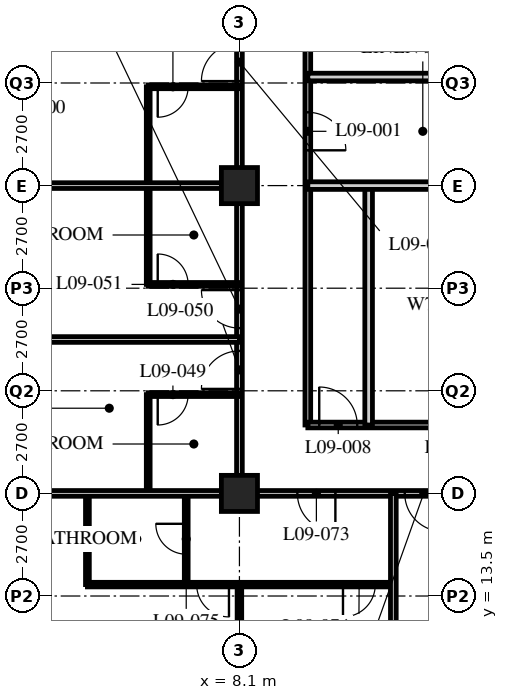
"""IFC4 building model, lengths in metres.
Left out: names, types, materials, properties, quantities, classifications, styles, units other than length and angle.
Written with IfcOpenShell. Run it as: python <this file> out.ifc"""

import sys

from ifc_helpers import new_model, si_unit, direction, frame, frame_2d, origin, origin_2d, place, context, subcontext, project, spatial, rectangle, hollow_rectangle, extrude, element, fill, save


model = new_model("IFC4")
c1 = context("Model", 3, precision=1e-05, world=origin(), true_north=direction((0.0, 1.0)))
c2 = subcontext(c1, "Body", "Model", "MODEL_VIEW")
j1 = project(units=[si_unit("LENGTHUNIT", "METRE"), si_unit("PLANEANGLEUNIT", "RADIAN")], contexts=[c1])
p1 = place(None, origin())
s1 = spatial("IfcSite", under=j1, at=p1, CompositionType="ELEMENT")
p2 = place(p1, origin())
s2 = spatial("IfcBuilding", under=s1, at=p2, CompositionType="ELEMENT")
p3 = place(p2, frame((0.0, 0.0, 43.2)))
s3 = spatial("IfcBuildingStorey", under=s2, at=p3, CompositionType="ELEMENT", Elevation=43.2)
for number, where, z_axis, x_axis in (
    (1, (8.1, 16.2, 0.0), (0.0, 0.0, 1.0), (1.0, 0.0, 0.0)),
    (2, (8.1, 24.3, 0.0), (0.0, 0.0, 1.0), (1.0, 0.0, 0.0)),
):
    element("IfcColumn", number, at=place(p3, frame(where, z_axis=z_axis, x_axis=x_axis)), inside=s3, PredefinedType="COLUMN", context=c2, shape_type="SweptSolid", body=[
        extrude(hollow_rectangle(XDim=0.95, YDim=0.95, WallThickness=0.095, at=origin_2d()), origin(), (0.0, 0.0, 1.0), 3.4),
    ])
p4 = place(p3, frame((8.1, 16.2, 0.0), z_axis=(0.0, 0.0, 1.0), x_axis=(1.0, 0.0, 0.0)))
e3 = element("IfcWall", 3, at=p4, inside=s3, PredefinedType="PARTITIONING", context=c2, shape_type="SweptSolid", body=[
    extrude(rectangle(XDim=40.5, YDim=0.15, at=frame_2d((20.25, 0.0))), origin(), (0.0, 0.0, 1.0), 2.578),
])
p5 = place(p4, frame((4.35, 0.0, 0.0)))
e4 = element("IfcOpeningElement", 4, at=p5, cuts=e3, PredefinedType="OPENING", context=c2, shape_type="SweptSolid", body=[
    extrude(rectangle(XDim=1.0, YDim=2.1, at=frame_2d((0.5, 1.05))), frame((0.0, 0.085, 0.0), z_axis=(0.0, -1.0, 0.0), x_axis=(1.0, 0.0, 0.0)), (0.0, 0.0, 1.0), 0.17),
])
p6 = place(p4, frame((10.85, 0.0, 0.0)))
e5 = element("IfcOpeningElement", 5, at=p6, cuts=e3, PredefinedType="OPENING", context=c2, shape_type="SweptSolid", body=[
    extrude(rectangle(XDim=1.0, YDim=2.1, at=frame_2d((0.5, 1.05))), frame((0.0, 0.085, 0.0), z_axis=(0.0, -1.0, 0.0), x_axis=(1.0, 0.0, 0.0)), (0.0, 0.0, 1.0), 0.17),
])
p7 = place(p4, frame((12.75, 0.0, 0.0)))
e6 = element("IfcOpeningElement", 6, at=p7, cuts=e3, PredefinedType="OPENING", context=c2, shape_type="SweptSolid", body=[
    extrude(rectangle(XDim=1.0, YDim=2.1, at=frame_2d((0.5, 1.05))), frame((0.0, 0.085, 0.0), z_axis=(0.0, -1.0, 0.0), x_axis=(1.0, 0.0, 0.0)), (0.0, 0.0, 1.0), 0.17),
])
p8 = place(p4, frame((18.95, 0.0, 0.0)))
e7 = element("IfcOpeningElement", 7, at=p8, cuts=e3, PredefinedType="OPENING", context=c2, shape_type="SweptSolid", body=[
    extrude(rectangle(XDim=1.0, YDim=2.1, at=frame_2d((0.5, 1.05))), frame((0.0, 0.085, 0.0), z_axis=(0.0, -1.0, 0.0), x_axis=(1.0, 0.0, 0.0)), (0.0, 0.0, 1.0), 0.17),
])
p9 = place(p4, frame((20.55, 0.0, 0.0)))
e8 = element("IfcOpeningElement", 8, at=p9, cuts=e3, PredefinedType="OPENING", context=c2, shape_type="SweptSolid", body=[
    extrude(rectangle(XDim=1.0, YDim=2.1, at=frame_2d((0.5, 1.05))), frame((0.0, 0.085, 0.0), z_axis=(0.0, -1.0, 0.0), x_axis=(1.0, 0.0, 0.0)), (0.0, 0.0, 1.0), 0.17),
])
p10 = place(p4, frame((27.05, 0.0, 0.0)))
e9 = element("IfcOpeningElement", 9, at=p10, cuts=e3, PredefinedType="OPENING", context=c2, shape_type="SweptSolid", body=[
    extrude(rectangle(XDim=1.0, YDim=2.1, at=frame_2d((0.5, 1.05))), frame((0.0, 0.085, 0.0), z_axis=(0.0, -1.0, 0.0), x_axis=(1.0, 0.0, 0.0)), (0.0, 0.0, 1.0), 0.17),
])
p11 = place(p4, frame((28.95, 0.0, 0.0)))
e10 = element("IfcOpeningElement", 10, at=p11, cuts=e3, PredefinedType="OPENING", context=c2, shape_type="SweptSolid", body=[
    extrude(rectangle(XDim=1.0, YDim=2.1, at=frame_2d((0.5, 1.05))), frame((0.0, 0.085, 0.0), z_axis=(0.0, -1.0, 0.0), x_axis=(1.0, 0.0, 0.0)), (0.0, 0.0, 1.0), 0.17),
])
p12 = place(p4, frame((34.85, 0.0, 0.0)))
e11 = element("IfcOpeningElement", 11, at=p12, cuts=e3, PredefinedType="OPENING", context=c2, shape_type="SweptSolid", body=[
    extrude(rectangle(XDim=1.0, YDim=2.1, at=frame_2d((0.5, 1.05))), frame((0.0, 0.085, 0.0), z_axis=(0.0, -1.0, 0.0), x_axis=(1.0, 0.0, 0.0)), (0.0, 0.0, 1.0), 0.17),
])
p13 = place(p4, frame((1.525, 0.0, 0.0)))
e12 = element("IfcOpeningElement", 12, at=p13, cuts=e3, PredefinedType="OPENING", context=c2, shape_type="SweptSolid", body=[
    extrude(rectangle(XDim=1.0, YDim=2.1, at=frame_2d((0.5, 1.05))), frame((0.0, 0.085, 0.0), z_axis=(0.0, -1.0, 0.0), x_axis=(1.0, 0.0, 0.0)), (0.0, 0.0, 1.0), 0.17),
])
p14 = place(p4, frame((37.975, 0.0, 0.0)))
e13 = element("IfcOpeningElement", 13, at=p14, cuts=e3, PredefinedType="OPENING", context=c2, shape_type="SweptSolid", body=[
    extrude(rectangle(XDim=1.0, YDim=2.1, at=frame_2d((0.5, 1.05))), frame((0.0, 0.085, 0.0), z_axis=(0.0, -1.0, 0.0), x_axis=(1.0, 0.0, 0.0)), (0.0, 0.0, 1.0), 0.17),
])
p15 = place(p3, frame((8.1, 16.2, 0.0), z_axis=(0.0, 0.0, 1.0), x_axis=(0.0, 1.0, 0.0)))
e14 = element("IfcWall", 14, at=p15, inside=s3, PredefinedType="PARTITIONING", context=c2, shape_type="SweptSolid", body=[
    extrude(rectangle(XDim=26.1, YDim=0.15, at=frame_2d((13.05, 0.0))), origin(), (0.0, 0.0, 1.0), 2.578),
])
p16 = place(p15, frame((2.75, 0.0, 0.0)))
e15 = element("IfcOpeningElement", 15, at=p16, cuts=e14, PredefinedType="OPENING", context=c2, shape_type="SweptSolid", body=[
    extrude(rectangle(XDim=1.0, YDim=2.1, at=frame_2d((0.5, 1.05))), frame((0.0, 0.085, 0.0), z_axis=(0.0, -1.0, 0.0), x_axis=(1.0, 0.0, 0.0)), (0.0, 0.0, 1.0), 0.17),
])
p17 = place(p15, frame((4.35, 0.0, 0.0)))
e16 = element("IfcOpeningElement", 16, at=p17, cuts=e14, PredefinedType="OPENING", context=c2, shape_type="SweptSolid", body=[
    extrude(rectangle(XDim=1.0, YDim=2.1, at=frame_2d((0.5, 1.05))), frame((0.0, 0.085, 0.0), z_axis=(0.0, -1.0, 0.0), x_axis=(1.0, 0.0, 0.0)), (0.0, 0.0, 1.0), 0.17),
])
p18 = place(p15, frame((10.85, 0.0, 0.0)))
e17 = element("IfcOpeningElement", 17, at=p18, cuts=e14, PredefinedType="OPENING", context=c2, shape_type="SweptSolid", body=[
    extrude(rectangle(XDim=1.0, YDim=2.1, at=frame_2d((0.5, 1.05))), frame((0.0, 0.085, 0.0), z_axis=(0.0, -1.0, 0.0), x_axis=(1.0, 0.0, 0.0)), (0.0, 0.0, 1.0), 0.17),
])
p19 = place(p15, frame((12.45, 0.0, 0.0)))
e18 = element("IfcOpeningElement", 18, at=p19, cuts=e14, PredefinedType="OPENING", context=c2, shape_type="SweptSolid", body=[
    extrude(rectangle(XDim=1.0, YDim=2.1, at=frame_2d((0.5, 1.05))), frame((0.0, 0.085, 0.0), z_axis=(0.0, -1.0, 0.0), x_axis=(1.0, 0.0, 0.0)), (0.0, 0.0, 1.0), 0.17),
])
p20 = place(p15, frame((18.65, 0.0, 0.0)))
e19 = element("IfcOpeningElement", 19, at=p20, cuts=e14, PredefinedType="OPENING", context=c2, shape_type="SweptSolid", body=[
    extrude(rectangle(XDim=1.0, YDim=2.1, at=frame_2d((0.5, 1.05))), frame((0.0, 0.085, 0.0), z_axis=(0.0, -1.0, 0.0), x_axis=(1.0, 0.0, 0.0)), (0.0, 0.0, 1.0), 0.17),
])
p21 = place(p15, frame((22.7, 0.0, 0.0)))
e20 = element("IfcOpeningElement", 20, at=p21, cuts=e14, PredefinedType="OPENING", context=c2, shape_type="SweptSolid", body=[
    extrude(rectangle(XDim=1.0, YDim=2.1, at=frame_2d((0.5, 1.05))), frame((0.0, 0.085, 0.0), z_axis=(0.0, -1.0, 0.0), x_axis=(1.0, 0.0, 0.0)), (0.0, 0.0, 1.0), 0.17),
])
p22 = place(p3, frame((9.9, 40.5, 0.0), z_axis=(0.0, 0.0, 1.0), x_axis=(0.0, -1.0, 0.0)))
e21 = element("IfcWall", 21, at=p22, inside=s3, PredefinedType="PARTITIONING", context=c2, shape_type="SweptSolid", body=[
    extrude(rectangle(XDim=22.5, YDim=0.15, at=frame_2d((11.25, 0.0))), origin(), (0.0, 0.0, 1.0), 3.19),
])
p23 = place(p22, frame((14.271, 0.0, 0.0)))
e22 = element("IfcOpeningElement", 22, at=p23, cuts=e21, PredefinedType="OPENING", context=c2, shape_type="SweptSolid", body=[
    extrude(rectangle(XDim=1.0, YDim=2.1, at=frame_2d((0.5, 1.05))), frame((0.0, 0.085, 0.0), z_axis=(0.0, -1.0, 0.0), x_axis=(1.0, 0.0, 0.0)), (0.0, 0.0, 1.0), 0.17),
])
p24 = place(p22, frame((10.221, 0.0, 0.0)))
e23 = element("IfcOpeningElement", 23, at=p24, cuts=e21, PredefinedType="OPENING", context=c2, shape_type="SweptSolid", body=[
    extrude(rectangle(XDim=1.0, YDim=2.1, at=frame_2d((0.5, 1.05))), frame((0.0, 0.085, 0.0), z_axis=(0.0, -1.0, 0.0), x_axis=(1.0, 0.0, 0.0)), (0.0, 0.0, 1.0), 0.17),
])
p25 = place(p22, frame((6.8, 0.0, 0.0)))
e24 = element("IfcOpeningElement", 24, at=p25, cuts=e21, PredefinedType="OPENING", context=c2, shape_type="SweptSolid", body=[
    extrude(rectangle(XDim=1.0, YDim=2.1, at=frame_2d((0.5, 1.05))), frame((0.0, 0.085, 0.0), z_axis=(0.0, -1.0, 0.0), x_axis=(1.0, 0.0, 0.0)), (0.0, 0.0, 1.0), 0.17),
])
p26 = place(p22, frame((2.75, 0.0, 0.0)))
e25 = element("IfcOpeningElement", 25, at=p26, cuts=e21, PredefinedType="OPENING", context=c2, shape_type="SweptSolid", body=[
    extrude(rectangle(XDim=1.0, YDim=2.1, at=frame_2d((0.5, 1.05))), frame((0.0, 0.085, 0.0), z_axis=(0.0, -1.0, 0.0), x_axis=(1.0, 0.0, 0.0)), (0.0, 0.0, 1.0), 0.17),
])
p27 = place(p3, frame((9.9, 18.0, 0.0), z_axis=(0.0, 0.0, 1.0), x_axis=(1.0, 0.0, 0.0)))
e26 = element("IfcWall", 26, at=p27, inside=s3, PredefinedType="PARTITIONING", context=c2, shape_type="SweptSolid", body=[
    extrude(rectangle(XDim=17.24, YDim=0.15, at=frame_2d((8.62, 0.0))), origin(), (0.0, 0.0, 1.0), 3.19),
])
p28 = place(p27, frame((0.3, 0.0, 0.0)))
e27 = element("IfcOpeningElement", 27, at=p28, cuts=e26, PredefinedType="OPENING", context=c2, shape_type="SweptSolid", body=[
    extrude(rectangle(XDim=1.0, YDim=2.1, at=frame_2d((0.5, 1.05))), frame((0.0, 0.085, 0.0), z_axis=(0.0, -1.0, 0.0), x_axis=(1.0, 0.0, 0.0)), (0.0, 0.0, 1.0), 0.17),
])
p29 = place(p27, frame((3.45, 0.0, 0.0)))
e28 = element("IfcOpeningElement", 28, at=p29, cuts=e26, PredefinedType="OPENING", context=c2, shape_type="SweptSolid", body=[
    extrude(rectangle(XDim=1.0, YDim=2.1, at=frame_2d((0.5, 1.05))), frame((0.0, 0.085, 0.0), z_axis=(0.0, -1.0, 0.0), x_axis=(1.0, 0.0, 0.0)), (0.0, 0.0, 1.0), 0.17),
])
p30 = place(p27, frame((7.229, 0.0, 0.0)))
e29 = element("IfcOpeningElement", 29, at=p30, cuts=e26, PredefinedType="OPENING", context=c2, shape_type="SweptSolid", body=[
    extrude(rectangle(XDim=1.0, YDim=2.1, at=frame_2d((0.5, 1.05))), frame((0.0, 0.085, 0.0), z_axis=(0.0, -1.0, 0.0), x_axis=(1.0, 0.0, 0.0)), (0.0, 0.0, 1.0), 0.17),
])
p31 = place(p27, frame((12.704, 0.0, 0.0)))
e30 = element("IfcOpeningElement", 30, at=p31, cuts=e26, PredefinedType="OPENING", context=c2, shape_type="SweptSolid", body=[
    extrude(rectangle(XDim=1.0, YDim=2.1, at=frame_2d((0.5, 1.05))), frame((0.0, 0.085, 0.0), z_axis=(0.0, -1.0, 0.0), x_axis=(1.0, 0.0, 0.0)), (0.0, 0.0, 1.0), 0.17),
])
for number, where, z_axis, x_axis in (
    (31, (9.9, 27.157, 0.0), (0.0, 0.0, 1.0), (1.0, 0.0, 0.0)),
    (32, (11.5, 18.0, 0.0), (0.0, 0.0, 1.0), (0.0, 1.0, 0.0)),
):
    element("IfcWall", number, at=place(p3, frame(where, z_axis=z_axis, x_axis=x_axis)), inside=s3, PredefinedType="SOLIDWALL", context=c2, shape_type="SweptSolid", body=[
        extrude(rectangle(XDim=6.3, YDim=0.2, at=frame_2d((3.15, 0.0))), origin(), (0.0, 0.0, 1.0), 3.19),
    ])
p32 = place(p3, frame((9.9, 24.3, 0.0), z_axis=(0.0, 0.0, 1.0), x_axis=(1.0, 0.0, 0.0)))
e33 = element("IfcWall", 33, at=p32, inside=s3, PredefinedType="SOLIDWALL", context=c2, shape_type="SweptSolid", body=[
    extrude(rectangle(XDim=6.3, YDim=0.2, at=frame_2d((3.15, 0.0))), origin(), (0.0, 0.0, 1.0), 2.578),
])
p33 = place(p3, frame((5.7, 16.2, 0.0), z_axis=(0.0, 0.0, 1.0), x_axis=(0.0, 1.0, 0.0)))
e34 = element("IfcWall", 34, at=p33, inside=s3, PredefinedType="PARTITIONING", context=c2, shape_type="SweptSolid", body=[
    extrude(rectangle(XDim=2.6, YDim=0.1, at=frame_2d((1.3, 0.0))), origin(), (0.0, 0.0, 1.0), 3.19),
])
p34 = place(p3, frame((8.1, 18.8, 0.0), z_axis=(0.0, 0.0, 1.0), x_axis=(-1.0, 0.0, 0.0)))
e35 = element("IfcWall", 35, at=p34, inside=s3, PredefinedType="PARTITIONING", context=c2, shape_type="SweptSolid", body=[
    extrude(rectangle(XDim=2.4, YDim=0.1, at=frame_2d((1.2, 0.0))), origin(), (0.0, 0.0, 1.0), 3.19),
])
p35 = place(p34, frame((1.35, 0.0, 0.0)))
e36 = element("IfcOpeningElement", 36, at=p35, cuts=e35, PredefinedType="OPENING", context=c2, shape_type="SweptSolid", body=[
    extrude(rectangle(XDim=0.8, YDim=2.1, at=frame_2d((0.4, 1.05))), frame((0.0, 0.06, 0.0), z_axis=(0.0, -1.0, 0.0), x_axis=(1.0, 0.0, 0.0)), (0.0, 0.0, 1.0), 0.12),
])
p36 = place(p3, frame((8.1, 20.25, 0.0), z_axis=(0.0, 0.0, 1.0), x_axis=(-1.0, 0.0, 0.0)))
e37 = element("IfcWall", 37, at=p36, inside=s3, PredefinedType="PARTITIONING", context=c2, shape_type="SweptSolid", body=[
    extrude(rectangle(XDim=7.8, YDim=0.15, at=frame_2d((3.9, 0.0))), origin(), (0.0, 0.0, 1.0), 3.19),
])
p37 = place(p3, frame((5.7, 21.7, 0.0), z_axis=(0.0, 0.0, 1.0), x_axis=(0.0, 1.0, 0.0)))
e38 = element("IfcWall", 38, at=p37, inside=s3, PredefinedType="PARTITIONING", context=c2, shape_type="SweptSolid", body=[
    extrude(rectangle(XDim=5.2, YDim=0.1, at=frame_2d((2.6, 0.0))), origin(), (0.0, 0.0, 1.0), 3.19),
])
p38 = place(p3, frame((8.1, 21.7, 0.0), z_axis=(0.0, 0.0, 1.0), x_axis=(-1.0, 0.0, 0.0)))
e39 = element("IfcWall", 39, at=p38, inside=s3, PredefinedType="PARTITIONING", context=c2, shape_type="SweptSolid", body=[
    extrude(rectangle(XDim=2.4, YDim=0.1, at=frame_2d((1.2, 0.0))), origin(), (0.0, 0.0, 1.0), 3.19),
])
p39 = place(p38, frame((1.35, 0.0, 0.0)))
e40 = element("IfcOpeningElement", 40, at=p39, cuts=e39, PredefinedType="OPENING", context=c2, shape_type="SweptSolid", body=[
    extrude(rectangle(XDim=0.8, YDim=2.1, at=frame_2d((0.4, 1.05))), frame((0.0, 0.06, 0.0), z_axis=(0.0, -1.0, 0.0), x_axis=(1.0, 0.0, 0.0)), (0.0, 0.0, 1.0), 0.12),
])
p40 = place(p3, frame((8.1, 24.3, 0.0), z_axis=(0.0, 0.0, 1.0), x_axis=(-1.0, 0.0, 0.0)))
e41 = element("IfcWall", 41, at=p40, inside=s3, PredefinedType="PARTITIONING", context=c2, shape_type="SweptSolid", body=[
    extrude(rectangle(XDim=7.8, YDim=0.15, at=frame_2d((3.9, 0.0))), origin(), (0.0, 0.0, 1.0), 2.578),
])
p41 = place(p3, frame((8.1, 26.9, 0.0), z_axis=(0.0, 0.0, 1.0), x_axis=(-1.0, 0.0, 0.0)))
e42 = element("IfcWall", 42, at=p41, inside=s3, PredefinedType="PARTITIONING", context=c2, shape_type="SweptSolid", body=[
    extrude(rectangle(XDim=2.4, YDim=0.1, at=frame_2d((1.2, 0.0))), origin(), (0.0, 0.0, 1.0), 3.19),
])
p42 = place(p41, frame((1.35, 0.0, 0.0)))
e43 = element("IfcOpeningElement", 43, at=p42, cuts=e42, PredefinedType="OPENING", context=c2, shape_type="SweptSolid", body=[
    extrude(rectangle(XDim=0.8, YDim=2.1, at=frame_2d((0.4, 1.05))), frame((0.0, 0.06, 0.0), z_axis=(0.0, -1.0, 0.0), x_axis=(1.0, 0.0, 0.0)), (0.0, 0.0, 1.0), 0.12),
])
p43 = place(p3, frame((6.7, 16.2, 0.0), z_axis=(0.0, 0.0, 1.0), x_axis=(0.0, -1.0, 0.0)))
e44 = element("IfcWall", 44, at=p43, inside=s3, PredefinedType="PARTITIONING", context=c2, shape_type="SweptSolid", body=[
    extrude(rectangle(XDim=2.4, YDim=0.1, at=frame_2d((1.2, 0.0))), origin(), (0.0, 0.0, 1.0), 3.19),
])
p44 = place(p43, frame((0.8, 0.0, 0.0)))
e45 = element("IfcOpeningElement", 45, at=p44, cuts=e44, PredefinedType="OPENING", context=c2, shape_type="SweptSolid", body=[
    extrude(rectangle(XDim=0.8, YDim=2.1, at=frame_2d((0.4, 1.05))), frame((0.0, 0.06, 0.0), z_axis=(0.0, -1.0, 0.0), x_axis=(1.0, 0.0, 0.0)), (0.0, 0.0, 1.0), 0.12),
])
p45 = place(p3, frame((4.1, 16.2, 0.0), z_axis=(0.0, 0.0, 1.0), x_axis=(0.0, -1.0, 0.0)))
e46 = element("IfcWall", 46, at=p45, inside=s3, PredefinedType="PARTITIONING", context=c2, shape_type="SweptSolid", body=[
    extrude(rectangle(XDim=2.4, YDim=0.1, at=frame_2d((1.2, 0.0))), origin(), (0.0, 0.0, 1.0), 3.19),
])
p46 = place(p3, frame((4.1, 13.8, 0.0), z_axis=(0.0, 0.0, 1.0), x_axis=(1.0, 0.0, 0.0)))
e47 = element("IfcWall", 47, at=p46, inside=s3, PredefinedType="PARTITIONING", context=c2, shape_type="SweptSolid", body=[
    extrude(rectangle(XDim=8.05, YDim=0.12, at=frame_2d((4.025, 0.0))), origin(), (0.0, 0.0, 1.0), 3.19),
])
p47 = place(p46, frame((6.725, 0.0, 0.0)))
e48 = element("IfcOpeningElement", 48, at=p47, cuts=e47, PredefinedType="OPENING", context=c2, shape_type="SweptSolid", body=[
    extrude(rectangle(XDim=0.85, YDim=2.1, at=frame_2d((0.425, 1.05))), frame((0.0, 0.07, 0.0), z_axis=(0.0, -1.0, 0.0), x_axis=(1.0, 0.0, 0.0)), (0.0, 0.0, 1.0), 0.14),
])
p48 = place(p46, frame((2.875, 0.0, 0.0)))
e49 = element("IfcOpeningElement", 49, at=p48, cuts=e47, PredefinedType="OPENING", context=c2, shape_type="SweptSolid", body=[
    extrude(rectangle(XDim=0.85, YDim=2.1, at=frame_2d((0.425, 1.05))), frame((0.0, 0.07, 0.0), z_axis=(0.0, -1.0, 0.0), x_axis=(1.0, 0.0, 0.0)), (0.0, 0.0, 1.0), 0.14),
])
p49 = place(p3, frame((8.1, 13.8, 0.0), z_axis=(0.0, 0.0, 1.0), x_axis=(0.0, -1.0, 0.0)))
e50 = element("IfcWall", 50, at=p49, inside=s3, PredefinedType="PARTITIONING", context=c2, shape_type="SweptSolid", body=[
    extrude(rectangle(XDim=9.45, YDim=0.12, at=frame_2d((4.725, 0.0))), origin(), (0.0, 0.0, 1.0), 2.578),
])
p50 = place(p3, frame((0.3, 16.2, 0.0), z_axis=(0.0, 0.0, 1.0), x_axis=(1.0, 0.0, 0.0)))
e51 = element("IfcWall", 51, at=p50, inside=s3, PredefinedType="PARTITIONING", context=c2, shape_type="SweptSolid", body=[
    extrude(rectangle(XDim=7.8, YDim=0.15, at=frame_2d((3.9, 0.0))), origin(), (0.0, 0.0, 1.0), 2.578),
])
p51 = place(p3, frame((12.15, 16.2, 0.0), z_axis=(0.0, 0.0, 1.0), x_axis=(0.0, -1.0, 0.0)))
e52 = element("IfcWall", 52, at=p51, inside=s3, PredefinedType="PARTITIONING", context=c2, shape_type="SweptSolid", body=[
    extrude(rectangle(XDim=15.9, YDim=0.15, at=frame_2d((7.95, 0.0))), origin(), (0.0, 0.0, 1.0), 3.19),
])
p52 = place(p23, origin())
e53 = element("IfcDoor", 53, at=p52, inside=s3, OperationType="SINGLE_SWING_RIGHT", PredefinedType="DOOR", context=c2, shape_type="SweptSolid", body=[
    extrude(rectangle(XDim=1.0, YDim=2.1, at=frame_2d((0.5, 1.05))), frame((0.0, 0.025, 0.0), z_axis=(0.0, -1.0, 0.0), x_axis=(1.0, 0.0, 0.0)), (0.0, 0.0, 1.0), 0.05),
])
fill(e22, e53)
p53 = place(p28, origin())
e54 = element("IfcDoor", 54, at=p53, inside=s3, OperationType="SINGLE_SWING_LEFT", PredefinedType="DOOR", context=c2, shape_type="SweptSolid", body=[
    extrude(rectangle(XDim=1.0, YDim=2.1, at=frame_2d((0.5, 1.05))), frame((0.0, 0.025, 0.0), z_axis=(0.0, -1.0, 0.0), x_axis=(1.0, 0.0, 0.0)), (0.0, 0.0, 1.0), 0.05),
])
fill(e27, e54)
p54 = place(p5, origin())
e55 = element("IfcDoor", 55, at=p54, inside=s3, OperationType="SINGLE_SWING_LEFT", PredefinedType="DOOR", context=c2, shape_type="SweptSolid", body=[
    extrude(rectangle(XDim=1.0, YDim=2.1, at=frame_2d((0.5, 1.05))), frame((0.0, 0.025, 0.0), z_axis=(0.0, -1.0, 0.0), x_axis=(1.0, 0.0, 0.0)), (0.0, 0.0, 1.0), 0.05),
])
fill(e4, e55)
p55 = place(p35, origin())
e56 = element("IfcDoor", 56, at=p55, inside=s3, OperationType="SINGLE_SWING_RIGHT", PredefinedType="DOOR", context=c2, shape_type="SweptSolid", body=[
    extrude(rectangle(XDim=0.8, YDim=2.1, at=frame_2d((0.4, 1.05))), frame((0.0, 0.025, 0.0), z_axis=(0.0, -1.0, 0.0), x_axis=(1.0, 0.0, 0.0)), (0.0, 0.0, 1.0), 0.05),
])
fill(e36, e56)
p56 = place(p16, origin())
e57 = element("IfcDoor", 57, at=p56, inside=s3, OperationType="SINGLE_SWING_LEFT", PredefinedType="DOOR", context=c2, shape_type="SweptSolid", body=[
    extrude(rectangle(XDim=1.0, YDim=2.1, at=frame_2d((0.5, 1.05))), frame((0.0, 0.025, 0.0), z_axis=(0.0, -1.0, 0.0), x_axis=(1.0, 0.0, 0.0)), (0.0, 0.0, 1.0), 0.05),
])
fill(e15, e57)
p57 = place(p39, origin())
e58 = element("IfcDoor", 58, at=p57, inside=s3, OperationType="SINGLE_SWING_LEFT", PredefinedType="DOOR", context=c2, shape_type="SweptSolid", body=[
    extrude(rectangle(XDim=0.8, YDim=2.1, at=frame_2d((0.4, 1.05))), frame((0.0, 0.025, 0.0), z_axis=(0.0, -1.0, 0.0), x_axis=(1.0, 0.0, 0.0)), (0.0, 0.0, 1.0), 0.05),
])
fill(e40, e58)
p58 = place(p17, origin())
e59 = element("IfcDoor", 59, at=p58, inside=s3, OperationType="SINGLE_SWING_RIGHT", PredefinedType="DOOR", context=c2, shape_type="SweptSolid", body=[
    extrude(rectangle(XDim=1.0, YDim=2.1, at=frame_2d((0.5, 1.05))), frame((0.0, 0.025, 0.0), z_axis=(0.0, -1.0, 0.0), x_axis=(1.0, 0.0, 0.0)), (0.0, 0.0, 1.0), 0.05),
])
fill(e16, e59)
p59 = place(p42, origin())
e60 = element("IfcDoor", 60, at=p59, inside=s3, OperationType="SINGLE_SWING_RIGHT", PredefinedType="DOOR", context=c2, shape_type="SweptSolid", body=[
    extrude(rectangle(XDim=0.8, YDim=2.1, at=frame_2d((0.4, 1.05))), frame((0.0, 0.025, 0.0), z_axis=(0.0, -1.0, 0.0), x_axis=(1.0, 0.0, 0.0)), (0.0, 0.0, 1.0), 0.05),
])
fill(e43, e60)
p60 = place(p18, origin())
e61 = element("IfcDoor", 61, at=p60, inside=s3, OperationType="SINGLE_SWING_LEFT", PredefinedType="DOOR", context=c2, shape_type="SweptSolid", body=[
    extrude(rectangle(XDim=1.0, YDim=2.1, at=frame_2d((0.5, 1.05))), frame((0.0, 0.025, 0.0), z_axis=(0.0, -1.0, 0.0), x_axis=(1.0, 0.0, 0.0)), (0.0, 0.0, 1.0), 0.05),
])
fill(e17, e61)
p61 = place(p13, origin())
e62 = element("IfcDoor", 62, at=p61, inside=s3, OperationType="SINGLE_SWING_LEFT", PredefinedType="DOOR", context=c2, shape_type="SweptSolid", body=[
    extrude(rectangle(XDim=1.0, YDim=2.1, at=frame_2d((0.5, 1.05))), frame((0.0, 0.025, 0.0), z_axis=(0.0, -1.0, 0.0), x_axis=(1.0, 0.0, 0.0)), (0.0, 0.0, 1.0), 0.05),
])
fill(e12, e62)
p62 = place(p47, origin())
e63 = element("IfcDoor", 63, at=p62, inside=s3, OperationType="SINGLE_SWING_RIGHT", PredefinedType="DOOR", context=c2, shape_type="SweptSolid", body=[
    extrude(rectangle(XDim=0.85, YDim=2.1, at=frame_2d((0.425, 1.05))), frame((0.0, 0.025, 0.0), z_axis=(0.0, -1.0, 0.0), x_axis=(1.0, 0.0, 0.0)), (0.0, 0.0, 1.0), 0.05),
])
fill(e48, e63)
p63 = place(p44, origin())
e64 = element("IfcDoor", 64, at=p63, inside=s3, OperationType="SINGLE_SWING_RIGHT", PredefinedType="DOOR", context=c2, shape_type="SweptSolid", body=[
    extrude(rectangle(XDim=0.8, YDim=2.1, at=frame_2d((0.4, 1.05))), frame((0.0, 0.025, 0.0), z_axis=(0.0, -1.0, 0.0), x_axis=(1.0, 0.0, 0.0)), (0.0, 0.0, 1.0), 0.05),
])
fill(e45, e64)
p64 = place(p48, origin())
e65 = element("IfcDoor", 65, at=p64, inside=s3, OperationType="SINGLE_SWING_LEFT", PredefinedType="DOOR", context=c2, shape_type="SweptSolid", body=[
    extrude(rectangle(XDim=0.85, YDim=2.1, at=frame_2d((0.425, 1.05))), frame((0.0, 0.025, 0.0), z_axis=(0.0, -1.0, 0.0), x_axis=(1.0, 0.0, 0.0)), (0.0, 0.0, 1.0), 0.05),
])
fill(e49, e65)
save(model, sys.argv[1])
